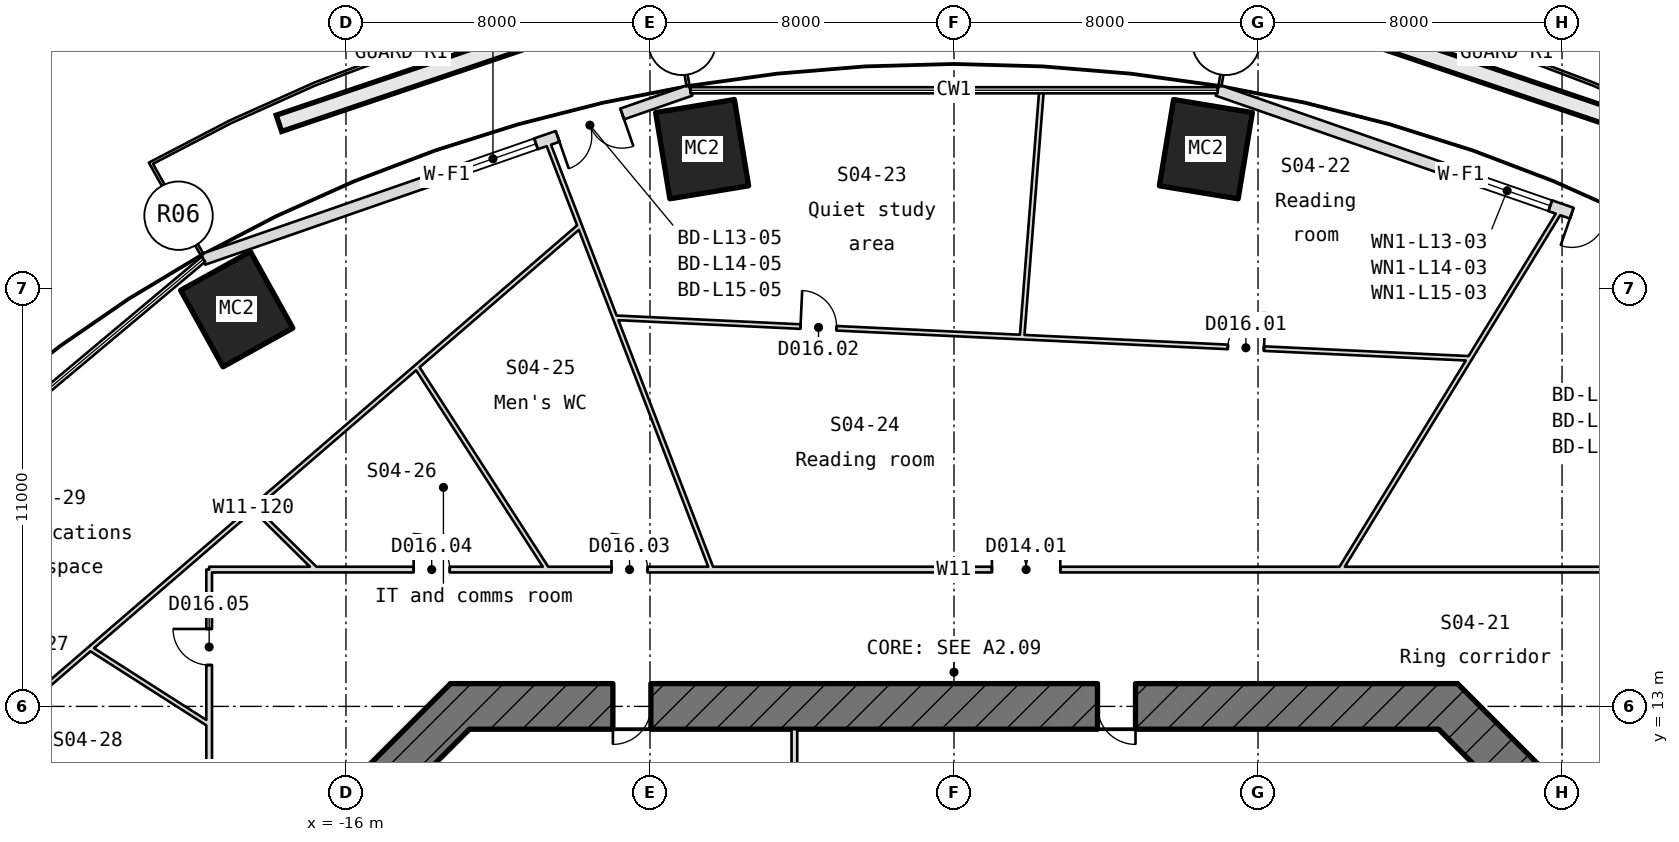
"""IFC4 building model, lengths in metres.
Left out: names, types, materials, properties, quantities, classifications, styles, units other than length and angle.
Written with IfcOpenShell. Run it as: python <this file> out.ifc"""

import sys

from ifc_helpers import new_model, si_unit, direction, frame, frame_2d, origin, origin_2d, place, context, subcontext, project, spatial, rectangle, hollow_rectangle, extrude, element, fill, save


model = new_model("IFC4")
c1 = context("Model", 3, precision=1e-05, world=origin(), true_north=direction((0.0, 1.0)))
c2 = subcontext(c1, "Body", "Model", "MODEL_VIEW")
j1 = project(units=[si_unit("LENGTHUNIT", "METRE"), si_unit("PLANEANGLEUNIT", "RADIAN")], contexts=[c1])
p1 = place(None, origin())
s1 = spatial("IfcSite", under=j1, at=p1, CompositionType="ELEMENT")
p2 = place(p1, origin())
s2 = spatial("IfcBuilding", under=s1, at=p2, CompositionType="ELEMENT")
p3 = place(p2, frame((0.0, 0.0, 70.35)))
s3 = spatial("IfcBuildingStorey", under=s2, at=p3, CompositionType="ELEMENT", Elevation=70.35)
for number, where, z_axis, x_axis in (
    (1, (6.628, 27.662, -0.18), (0.0, 0.0, 1.0), (0.987, -0.163, 0.0)),
    (2, (-6.628, 27.662, -0.18), (0.0, 0.0, 1.0), (0.987, 0.163, 0.0)),
    (3, (-18.875, 23.451, -0.18), (0.0, 0.0, 1.0), (0.874, 0.485, 0.0)),
):
    element("IfcColumn", number, at=place(p3, frame(where, z_axis=z_axis, x_axis=x_axis)), inside=s3, PredefinedType="COLUMN", context=c2, shape_type="SweptSolid", body=[
        extrude(hollow_rectangle(XDim=2.1, YDim=2.3, WallThickness=0.085, at=origin_2d()), origin(), (0.0, 0.0, 1.0), 4.15),
    ])
p4 = place(p3, frame((19.752, 24.764, 0.0), z_axis=(0.0, 0.0, 1.0), x_axis=(-0.94473738927, 0.327828103304, 0.0)))
e4 = element("IfcWall", 4, at=p4, inside=s3, PredefinedType="SOLIDWALL", context=c2, shape_type="SweptSolid", body=[
    extrude(rectangle(XDim=13.566, YDim=0.3, at=frame_2d((6.783, 0.0))), origin(), (0.0, 0.0, 1.0), 3.97),
])
p5 = place(p4, frame((1.9, 0.0, 0.0)))
e5 = element("IfcOpeningElement", 5, at=p5, cuts=e4, PredefinedType="OPENING", context=c2, shape_type="SweptSolid", body=[
    extrude(rectangle(XDim=1.8, YDim=2.4, at=frame_2d((0.9, 1.2))), frame((0.0, 0.16, 0.0), z_axis=(0.0, -1.0, 0.0), x_axis=(1.0, 0.0, 0.0)), (0.0, 0.0, 1.0), 0.32),
])
p6 = place(p4, frame((4.3, 0.0, 0.9)))
e6 = element("IfcOpeningElement", 6, at=p6, cuts=e4, PredefinedType="OPENING", context=c2, shape_type="SweptSolid", body=[
    extrude(rectangle(XDim=2.4, YDim=1.5, at=frame_2d((1.2, 0.75))), frame((0.0, 0.16, 0.0), z_axis=(0.0, -1.0, 0.0), x_axis=(1.0, 0.0, 0.0)), (0.0, 0.0, 1.0), 0.32),
])
p7 = place(p3, frame((-6.936, 29.212, 0.0), z_axis=(0.0, 0.0, 1.0), x_axis=(-0.94473738927, -0.327828103304, 0.0)))
e7 = element("IfcWall", 7, at=p7, inside=s3, PredefinedType="SOLIDWALL", context=c2, shape_type="SweptSolid", body=[
    extrude(rectangle(XDim=13.566, YDim=0.3, at=frame_2d((6.783, 0.0))), origin(), (0.0, 0.0, 1.0), 3.97),
])
p8 = place(p7, frame((1.9, 0.0, 0.0)))
e8 = element("IfcOpeningElement", 8, at=p8, cuts=e7, PredefinedType="OPENING", context=c2, shape_type="SweptSolid", body=[
    extrude(rectangle(XDim=1.8, YDim=2.4, at=frame_2d((0.9, 1.2))), frame((0.0, 0.16, 0.0), z_axis=(0.0, -1.0, 0.0), x_axis=(1.0, 0.0, 0.0)), (0.0, 0.0, 1.0), 0.32),
])
p9 = place(p7, frame((4.3, 0.0, 0.9)))
e9 = element("IfcOpeningElement", 9, at=p9, cuts=e7, PredefinedType="OPENING", context=c2, shape_type="SweptSolid", body=[
    extrude(rectangle(XDim=2.4, YDim=1.5, at=frame_2d((1.2, 0.75))), frame((0.0, 0.16, 0.0), z_axis=(0.0, -1.0, 0.0), x_axis=(1.0, 0.0, 0.0)), (0.0, 0.0, 1.0), 0.32),
])
p10 = place(p3, frame((16.176, 9.824, -0.18), z_axis=(0.0, 0.0, 1.0), x_axis=(-0.707106781187, 0.707106781187, 0.0)))
e10 = element("IfcWall", 10, at=p10, inside=s3, PredefinedType="SHEAR", context=c2, shape_type="SweptSolid", body=[
    extrude(rectangle(XDim=4.74, YDim=1.2, at=frame_2d((2.37, 0.0))), origin(), (0.0, 0.0, 1.0), 4.15),
])
p11 = place(p3, frame((13.249, 13.0, -0.18), z_axis=(0.0, 0.0, 1.0), x_axis=(-1.0, 0.0, 0.0)))
e11 = element("IfcWall", 11, at=p11, inside=s3, PredefinedType="SHEAR", context=c2, shape_type="SweptSolid", body=[
    extrude(rectangle(XDim=26.497, YDim=1.2, at=frame_2d((13.249, 0.0))), origin(), (0.0, 0.0, 1.0), 4.15),
])
p12 = place(p11, frame((21.225, 0.0, 0.18)))
e12 = element("IfcOpeningElement", 12, at=p12, cuts=e11, PredefinedType="OPENING", context=c2, shape_type="SweptSolid", body=[
    extrude(rectangle(XDim=1.0, YDim=2.1, at=frame_2d((0.5, 1.05))), frame((0.0, 0.61, 0.0), z_axis=(0.0, -1.0, 0.0), x_axis=(1.0, 0.0, 0.0)), (0.0, 0.0, 1.0), 1.22),
])
p13 = place(p11, frame((8.472, 0.0, 0.18)))
e13 = element("IfcOpeningElement", 13, at=p13, cuts=e11, PredefinedType="OPENING", context=c2, shape_type="SweptSolid", body=[
    extrude(rectangle(XDim=1.0, YDim=2.1, at=frame_2d((0.5, 1.05))), frame((0.0, 0.61, 0.0), z_axis=(0.0, -1.0, 0.0), x_axis=(1.0, 0.0, 0.0)), (0.0, 0.0, 1.0), 1.22),
])
p14 = place(p3, frame((-12.824, 13.176, -0.18), z_axis=(0.0, 0.0, 1.0), x_axis=(-0.707106781187, -0.707106781187, 0.0)))
e14 = element("IfcWall", 14, at=p14, inside=s3, PredefinedType="SHEAR", context=c2, shape_type="SweptSolid", body=[
    extrude(rectangle(XDim=4.74, YDim=1.2, at=frame_2d((2.37, 0.0))), origin(), (0.0, 0.0, 1.0), 4.15),
])
p15 = place(p3, frame((-4.2, 8.46, 0.0), z_axis=(0.0, 0.0, 1.0), x_axis=(0.0, 1.0, 0.0)))
e15 = element("IfcWall", 15, at=p15, inside=s3, PredefinedType="PARTITIONING", context=c2, shape_type="SweptSolid", body=[
    extrude(rectangle(XDim=3.94, YDim=0.15, at=frame_2d((1.97, 0.0))), origin(), (0.0, 0.0, 1.0), 3.97),
])
p16 = place(p3, frame((-22.729, 14.524, 0.0), z_axis=(0.0, 0.0, 1.0), x_axis=(0.842658134486, -0.538448946869, 0.0)))
e16 = element("IfcWall", 16, at=p16, inside=s3, PredefinedType="PARTITIONING", context=c2, shape_type="SweptSolid", body=[
    extrude(rectangle(XDim=3.713, YDim=0.12, at=frame_2d((1.856, 0.0))), origin(), (0.0, 0.0, 1.0), 3.97),
])
p17 = place(p3, frame((-19.6, -16.6, 0.0), z_axis=(0.0, 0.0, 1.0), x_axis=(0.0, 1.0, 0.0)))
e17 = element("IfcWall", 17, at=p17, inside=s3, PredefinedType="PARTITIONING", context=c2, shape_type="SweptSolid", body=[
    extrude(rectangle(XDim=33.2, YDim=0.15, at=frame_2d((16.6, 0.0))), origin(), (0.0, 0.0, 1.0), 3.97),
])
p18 = place(p17, frame((30.688, 0.0, 0.0)))
e18 = element("IfcOpeningElement", 18, at=p18, cuts=e17, PredefinedType="OPENING", context=c2, shape_type="SweptSolid", body=[
    extrude(rectangle(XDim=0.95, YDim=2.1, at=frame_2d((0.475, 1.05))), frame((0.0, 0.085, 0.0), z_axis=(0.0, -1.0, 0.0), x_axis=(1.0, 0.0, 0.0)), (0.0, 0.0, 1.0), 0.17),
])
p19 = place(p17, frame((26.311, 0.0, 0.0)))
e19 = element("IfcOpeningElement", 19, at=p19, cuts=e17, PredefinedType="OPENING", context=c2, shape_type="SweptSolid", body=[
    extrude(rectangle(XDim=0.95, YDim=2.1, at=frame_2d((0.475, 1.05))), frame((0.0, 0.085, 0.0), z_axis=(0.0, -1.0, 0.0), x_axis=(1.0, 0.0, 0.0)), (0.0, 0.0, 1.0), 0.17),
])
p20 = place(p17, frame((22.426, 0.0, 0.0)))
e20 = element("IfcOpeningElement", 20, at=p20, cuts=e17, PredefinedType="OPENING", context=c2, shape_type="SweptSolid", body=[
    extrude(rectangle(XDim=0.95, YDim=2.1, at=frame_2d((0.475, 1.05))), frame((0.0, 0.085, 0.0), z_axis=(0.0, -1.0, 0.0), x_axis=(1.0, 0.0, 0.0)), (0.0, 0.0, 1.0), 0.17),
])
p21 = place(p17, frame((9.778, 0.0, 0.0)))
e21 = element("IfcOpeningElement", 21, at=p21, cuts=e17, PredefinedType="OPENING", context=c2, shape_type="SweptSolid", body=[
    extrude(rectangle(XDim=1.8, YDim=2.1, at=frame_2d((0.9, 1.05))), frame((0.0, 0.085, 0.0), z_axis=(0.0, -1.0, 0.0), x_axis=(1.0, 0.0, 0.0)), (0.0, 0.0, 1.0), 0.17),
])
p22 = place(p3, frame((-19.6, 16.6, 0.0), z_axis=(0.0, 0.0, 1.0), x_axis=(1.0, 0.0, 0.0)))
e22 = element("IfcWall", 22, at=p22, inside=s3, PredefinedType="PARTITIONING", context=c2, shape_type="SweptSolid", body=[
    extrude(rectangle(XDim=39.2, YDim=0.15, at=frame_2d((19.6, 0.0))), origin(), (0.0, 0.0, 1.0), 3.97),
])
p23 = place(p22, frame((20.597, 0.0, 0.0)))
e23 = element("IfcOpeningElement", 23, at=p23, cuts=e22, PredefinedType="OPENING", context=c2, shape_type="SweptSolid", body=[
    extrude(rectangle(XDim=1.8, YDim=2.1, at=frame_2d((0.9, 1.05))), frame((0.0, 0.085, 0.0), z_axis=(0.0, -1.0, 0.0), x_axis=(1.0, 0.0, 0.0)), (0.0, 0.0, 1.0), 0.17),
])
p24 = place(p22, frame((10.587, 0.0, 0.0)))
e24 = element("IfcOpeningElement", 24, at=p24, cuts=e22, PredefinedType="OPENING", context=c2, shape_type="SweptSolid", body=[
    extrude(rectangle(XDim=0.95, YDim=2.1, at=frame_2d((0.475, 1.05))), frame((0.0, 0.085, 0.0), z_axis=(0.0, -1.0, 0.0), x_axis=(1.0, 0.0, 0.0)), (0.0, 0.0, 1.0), 0.17),
])
p25 = place(p22, frame((5.381, 0.0, 0.0)))
e25 = element("IfcOpeningElement", 25, at=p25, cuts=e22, PredefinedType="OPENING", context=c2, shape_type="SweptSolid", body=[
    extrude(rectangle(XDim=0.95, YDim=2.1, at=frame_2d((0.475, 1.05))), frame((0.0, 0.085, 0.0), z_axis=(0.0, -1.0, 0.0), x_axis=(1.0, 0.0, 0.0)), (0.0, 0.0, 1.0), 0.17),
])
p26 = place(p3, frame((-18.435, 18.229, 0.0), z_axis=(0.0, 0.0, 1.0), x_axis=(0.711099857719, -0.703091027074, 0.0)))
e26 = element("IfcWall", 26, at=p26, inside=s3, PredefinedType="PARTITIONING", context=c2, shape_type="SweptSolid", body=[
    extrude(rectangle(XDim=2.317, YDim=0.12, at=frame_2d((1.158, 0.0))), origin(), (0.0, 0.0, 1.0), 3.97),
])
p27 = place(p3, frame((-14.141, 21.934, 0.0), z_axis=(0.0, 0.0, 1.0), x_axis=(0.541842063077, -0.840480326171, 0.0)))
e27 = element("IfcWall", 27, at=p27, inside=s3, PredefinedType="PARTITIONING", context=c2, shape_type="SweptSolid", body=[
    extrude(rectangle(XDim=6.346, YDim=0.12, at=frame_2d((3.173, 0.0))), origin(), (0.0, 0.0, 1.0), 3.97),
])
p28 = place(p3, frame((-9.847, 25.639, 0.0), z_axis=(0.0, 0.0, 1.0), x_axis=(-0.757112580358, -0.653284425548, 0.0)))
e28 = element("IfcWall", 28, at=p28, inside=s3, PredefinedType="PARTITIONING", context=c2, shape_type="SweptSolid", body=[
    extrude(rectangle(XDim=22.686, YDim=0.12, at=frame_2d((11.343, 0.0))), origin(), (0.0, 0.0, 1.0), 3.97),
])
p29 = place(p3, frame((-6.375, 16.6, 0.0), z_axis=(0.0, 0.0, 1.0), x_axis=(-0.358534397195, 0.933516516205, 0.0)))
e29 = element("IfcWall", 29, at=p29, inside=s3, PredefinedType="PARTITIONING", context=c2, shape_type="SweptSolid", body=[
    extrude(rectangle(XDim=12.105, YDim=0.12, at=frame_2d((6.052, 0.0))), origin(), (0.0, 0.0, 1.0), 3.97),
])
p30 = place(p3, frame((2.302, 29.212, 0.0), z_axis=(0.0, 0.0, 1.0), x_axis=(-0.078544698075, -0.996910592984, 0.0)))
e30 = element("IfcWall", 30, at=p30, inside=s3, PredefinedType="PARTITIONING", context=c2, shape_type="SweptSolid", body=[
    extrude(rectangle(XDim=6.515, YDim=0.12, at=frame_2d((3.257, 0.0))), origin(), (0.0, 0.0, 1.0), 3.97),
])
p31 = place(p3, frame((10.169, 16.6, 0.0), z_axis=(0.0, 0.0, 1.0), x_axis=(0.522354417251, 0.852728481276, 0.0)))
e31 = element("IfcWall", 31, at=p31, inside=s3, PredefinedType="PARTITIONING", context=c2, shape_type="SweptSolid", body=[
    extrude(rectangle(XDim=11.112, YDim=0.12, at=frame_2d((5.556, 0.0))), origin(), (0.0, 0.0, 1.0), 3.97),
])
p32 = place(p3, frame((13.572, 22.156, 0.0), z_axis=(0.0, 0.0, 1.0), x_axis=(-0.998870221803, 0.047521363561, 0.0)))
e32 = element("IfcWall", 32, at=p32, inside=s3, PredefinedType="PARTITIONING", context=c2, shape_type="SweptSolid", body=[
    extrude(rectangle(XDim=22.518, YDim=0.12, at=frame_2d((11.259, 0.0))), origin(), (0.0, 0.0, 1.0), 3.97),
])
p33 = place(p32, frame((5.423, 0.0, 0.0)))
e33 = element("IfcOpeningElement", 33, at=p33, cuts=e32, PredefinedType="OPENING", context=c2, shape_type="SweptSolid", body=[
    extrude(rectangle(XDim=0.95, YDim=2.1, at=frame_2d((0.475, 1.05))), frame((0.0, 0.07, 0.0), z_axis=(0.0, -1.0, 0.0), x_axis=(1.0, 0.0, 0.0)), (0.0, 0.0, 1.0), 0.14),
])
p34 = place(p32, frame((16.682, 0.0, 0.0)))
e34 = element("IfcOpeningElement", 34, at=p34, cuts=e32, PredefinedType="OPENING", context=c2, shape_type="SweptSolid", body=[
    extrude(rectangle(XDim=0.95, YDim=2.1, at=frame_2d((0.475, 1.05))), frame((0.0, 0.07, 0.0), z_axis=(0.0, -1.0, 0.0), x_axis=(1.0, 0.0, 0.0)), (0.0, 0.0, 1.0), 0.14),
])
p35 = place(p5, origin())
e35 = element("IfcDoor", 35, at=p35, inside=s3, OperationType="SINGLE_SWING_LEFT", PredefinedType="DOOR", context=c2, shape_type="SweptSolid", body=[
    extrude(rectangle(XDim=1.8, YDim=2.4, at=frame_2d((0.9, 1.2))), frame((0.0, 0.025, 0.0), z_axis=(0.0, -1.0, 0.0), x_axis=(1.0, 0.0, 0.0)), (0.0, 0.0, 1.0), 0.05),
])
fill(e5, e35)
p36 = place(p6, origin())
e36 = element("IfcWindow", 36, at=p36, inside=s3, PartitioningType="SINGLE_PANEL", PredefinedType="WINDOW", context=c2, shape_type="SweptSolid", body=[
    extrude(rectangle(XDim=2.4, YDim=1.5, at=frame_2d((1.2, 0.75))), frame((0.0, 0.03, 0.0), z_axis=(0.0, -1.0, 0.0), x_axis=(1.0, 0.0, 0.0)), (0.0, 0.0, 1.0), 0.06),
])
fill(e6, e36)
p37 = place(p8, origin())
e37 = element("IfcDoor", 37, at=p37, inside=s3, OperationType="SINGLE_SWING_LEFT", PredefinedType="DOOR", context=c2, shape_type="SweptSolid", body=[
    extrude(rectangle(XDim=1.8, YDim=2.4, at=frame_2d((0.9, 1.2))), frame((0.0, 0.025, 0.0), z_axis=(0.0, -1.0, 0.0), x_axis=(1.0, 0.0, 0.0)), (0.0, 0.0, 1.0), 0.05),
])
fill(e8, e37)
p38 = place(p9, origin())
e38 = element("IfcWindow", 38, at=p38, inside=s3, PartitioningType="SINGLE_PANEL", PredefinedType="WINDOW", context=c2, shape_type="SweptSolid", body=[
    extrude(rectangle(XDim=2.4, YDim=1.5, at=frame_2d((1.2, 0.75))), frame((0.0, 0.03, 0.0), z_axis=(0.0, -1.0, 0.0), x_axis=(1.0, 0.0, 0.0)), (0.0, 0.0, 1.0), 0.06),
])
fill(e9, e38)
p39 = place(p12, origin())
e39 = element("IfcDoor", 39, at=p39, inside=s3, OperationType="SINGLE_SWING_RIGHT", PredefinedType="DOOR", context=c2, shape_type="SweptSolid", body=[
    extrude(rectangle(XDim=1.0, YDim=2.1, at=frame_2d((0.5, 1.05))), frame((0.0, 0.025, 0.0), z_axis=(0.0, -1.0, 0.0), x_axis=(1.0, 0.0, 0.0)), (0.0, 0.0, 1.0), 0.05),
])
fill(e12, e39)
p40 = place(p13, origin())
e40 = element("IfcDoor", 40, at=p40, inside=s3, OperationType="SINGLE_SWING_RIGHT", PredefinedType="DOOR", context=c2, shape_type="SweptSolid", body=[
    extrude(rectangle(XDim=1.0, YDim=2.1, at=frame_2d((0.5, 1.05))), frame((0.0, 0.025, 0.0), z_axis=(0.0, -1.0, 0.0), x_axis=(1.0, 0.0, 0.0)), (0.0, 0.0, 1.0), 0.05),
])
fill(e13, e40)
p41 = place(p33, frame((0.95, 0.0, 0.0), z_axis=(0.0, 0.0, 1.0), x_axis=(-1.0, 0.0, 0.0)))
e41 = element("IfcDoor", 41, at=p41, inside=s3, OperationType="SINGLE_SWING_LEFT", PredefinedType="DOOR", context=c2, shape_type="SweptSolid", body=[
    extrude(rectangle(XDim=0.95, YDim=2.1, at=frame_2d((0.475, 1.05))), frame((0.0, 0.025, 0.0), z_axis=(0.0, -1.0, 0.0), x_axis=(1.0, 0.0, 0.0)), (0.0, 0.0, 1.0), 0.05),
])
fill(e33, e41)
p42 = place(p34, frame((0.95, 0.0, 0.0), z_axis=(0.0, 0.0, 1.0), x_axis=(-1.0, 0.0, 0.0)))
e42 = element("IfcDoor", 42, at=p42, inside=s3, OperationType="SINGLE_SWING_LEFT", PredefinedType="DOOR", context=c2, shape_type="SweptSolid", body=[
    extrude(rectangle(XDim=0.95, YDim=2.1, at=frame_2d((0.475, 1.05))), frame((0.0, 0.025, 0.0), z_axis=(0.0, -1.0, 0.0), x_axis=(1.0, 0.0, 0.0)), (0.0, 0.0, 1.0), 0.05),
])
fill(e34, e42)
p43 = place(p23, origin())
e43 = element("IfcDoor", 43, at=p43, inside=s3, OperationType="DOUBLE_DOOR_SINGLE_SWING", PredefinedType="DOOR", context=c2, shape_type="SweptSolid", body=[
    extrude(rectangle(XDim=1.8, YDim=2.1, at=frame_2d((0.9, 1.05))), frame((0.0, 0.025, 0.0), z_axis=(0.0, -1.0, 0.0), x_axis=(1.0, 0.0, 0.0)), (0.0, 0.0, 1.0), 0.05),
])
fill(e23, e43)
p44 = place(p24, origin())
e44 = element("IfcDoor", 44, at=p44, inside=s3, OperationType="SINGLE_SWING_RIGHT", PredefinedType="DOOR", context=c2, shape_type="SweptSolid", body=[
    extrude(rectangle(XDim=0.95, YDim=2.1, at=frame_2d((0.475, 1.05))), frame((0.0, 0.025, 0.0), z_axis=(0.0, -1.0, 0.0), x_axis=(1.0, 0.0, 0.0)), (0.0, 0.0, 1.0), 0.05),
])
fill(e24, e44)
p45 = place(p25, origin())
e45 = element("IfcDoor", 45, at=p45, inside=s3, OperationType="SINGLE_SWING_RIGHT", PredefinedType="DOOR", context=c2, shape_type="SweptSolid", body=[
    extrude(rectangle(XDim=0.95, YDim=2.1, at=frame_2d((0.475, 1.05))), frame((0.0, 0.025, 0.0), z_axis=(0.0, -1.0, 0.0), x_axis=(1.0, 0.0, 0.0)), (0.0, 0.0, 1.0), 0.05),
])
fill(e25, e45)
p46 = place(p18, origin())
e46 = element("IfcDoor", 46, at=p46, inside=s3, OperationType="SINGLE_SWING_RIGHT", PredefinedType="DOOR", context=c2, shape_type="SweptSolid", body=[
    extrude(rectangle(XDim=0.95, YDim=2.1, at=frame_2d((0.475, 1.05))), frame((0.0, 0.025, 0.0), z_axis=(0.0, -1.0, 0.0), x_axis=(1.0, 0.0, 0.0)), (0.0, 0.0, 1.0), 0.05),
])
fill(e18, e46)
save(model, sys.argv[1])
